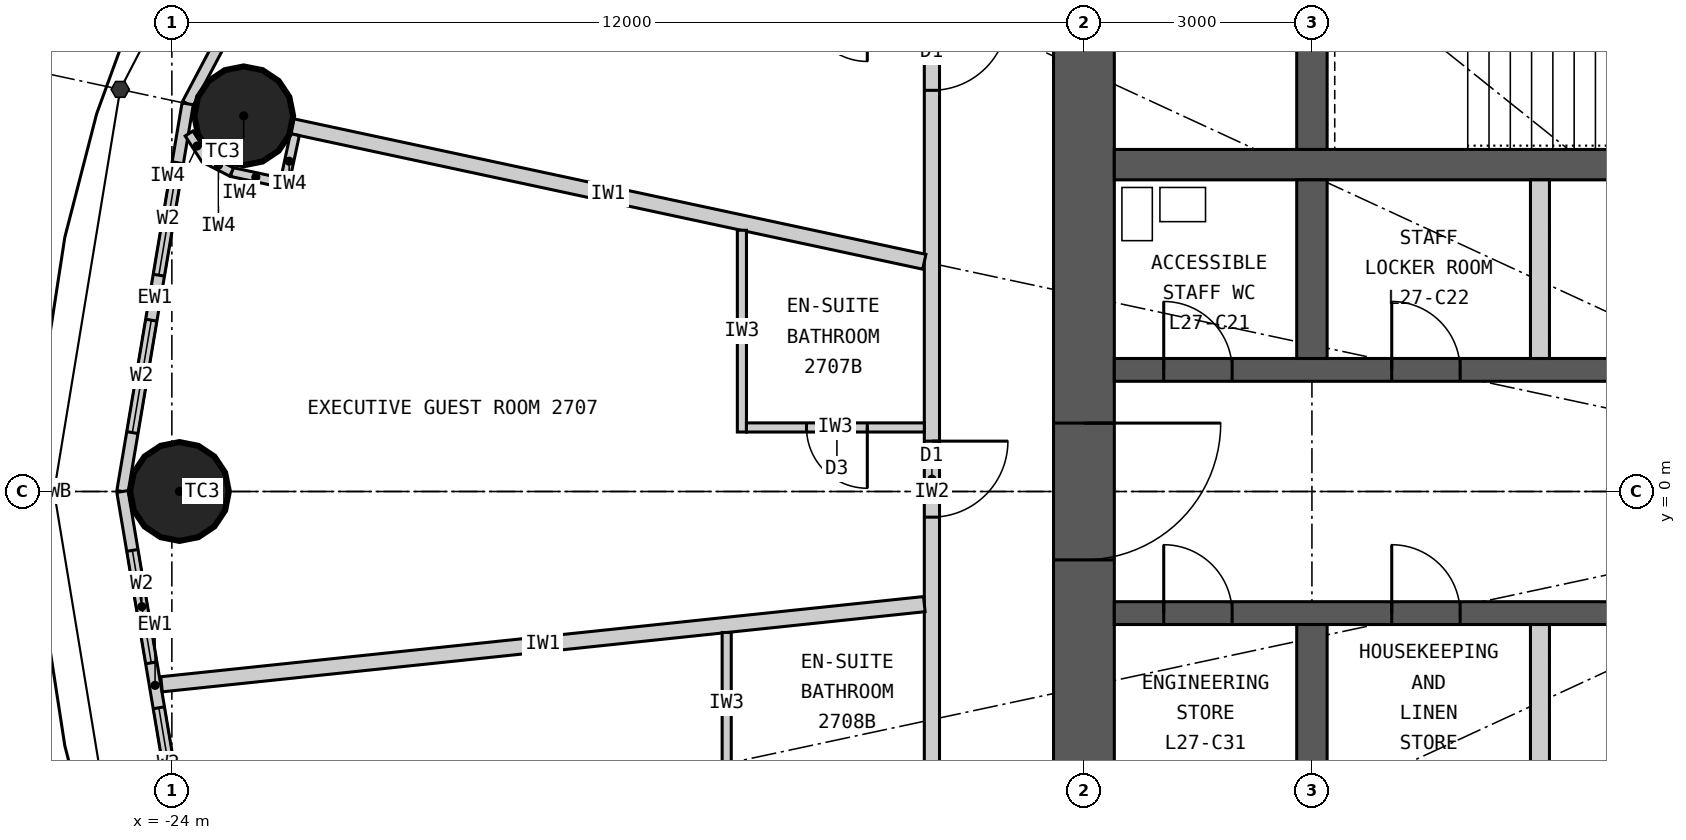
"""IFC4 building model, lengths in metres.
Left out: names, types, materials, properties, quantities, classifications, styles, units other than length and angle.
Written with IfcOpenShell. Run it as: python <this file> out.ifc"""

import sys

from ifc_helpers import new_model, si_unit, direction, frame, frame_2d, origin, origin_2d, place, context, subcontext, project, spatial, rectangle, circle, extrude, element, fill, save


model = new_model("IFC4")
c1 = context("Model", 3, precision=1e-05, world=origin(), true_north=direction((0.0, 1.0)))
c2 = subcontext(c1, "Body", "Model", "MODEL_VIEW")
j1 = project(units=[si_unit("LENGTHUNIT", "METRE"), si_unit("PLANEANGLEUNIT", "RADIAN")], contexts=[c1])
p1 = place(None, origin())
s1 = spatial("IfcSite", under=j1, at=p1, CompositionType="ELEMENT")
p2 = place(p1, origin())
s2 = spatial("IfcBuilding", under=s1, at=p2, CompositionType="ELEMENT")
p3 = place(p2, frame((0.0, 0.0, 108.9)))
s3 = spatial("IfcBuildingStorey", under=s2, at=p3, CompositionType="ELEMENT", Elevation=108.9)
for number, where, z_axis, x_axis in (
    (1, (-23.055, 4.942, 0.0), (0.0, 0.0, 1.0), (1.0, 0.0, 0.0)),
    (2, (-23.9, 0.0, 0.0), (0.0, 0.0, 1.0), (1.0, 0.0, 0.0)),
):
    element("IfcColumn", number, at=place(p3, frame(where, z_axis=z_axis, x_axis=x_axis)), inside=s3, PredefinedType="COLUMN", context=c2, shape_type="SweptSolid", body=[
        extrude(circle(Radius=0.65, at=origin_2d()), origin(), (0.0, 0.0, 1.0), 3.3),
    ])
p4 = place(p3, frame((-12.0, 7.6, 0.0), z_axis=(0.0, 0.0, 1.0), x_axis=(0.0, -1.0, 0.0)))
e3 = element("IfcWall", 3, at=p4, inside=s3, PredefinedType="SHEAR", context=c2, shape_type="SweptSolid", body=[
    extrude(rectangle(XDim=15.2, YDim=0.8, at=frame_2d((7.6, 0.0))), origin(), (0.0, 0.0, 1.0), 3.3),
])
p5 = place(p4, frame((6.7, 0.0, 0.0)))
e4 = element("IfcOpeningElement", 4, at=p5, cuts=e3, PredefinedType="OPENING", context=c2, shape_type="SweptSolid", body=[
    extrude(rectangle(XDim=1.8, YDim=2.2, at=frame_2d((0.9, 1.1))), frame((0.0, 0.41, 0.0), z_axis=(0.0, -1.0, 0.0), x_axis=(1.0, 0.0, 0.0)), (0.0, 0.0, 1.0), 0.82),
])
p6 = place(p3, frame((-11.6, 4.3, 0.0), z_axis=(0.0, 0.0, 1.0), x_axis=(1.0, 0.0, 0.0)))
e5 = element("IfcWall", 5, at=p6, inside=s3, PredefinedType="SHEAR", context=c2, shape_type="SweptSolid", body=[
    extrude(rectangle(XDim=23.2, YDim=0.4, at=frame_2d((11.6, 0.0))), origin(), (0.0, 0.0, 1.0), 3.3),
])
p7 = place(p3, frame((-11.6, 1.6, 0.0), z_axis=(0.0, 0.0, 1.0), x_axis=(1.0, 0.0, 0.0)))
e6 = element("IfcWall", 6, at=p7, inside=s3, PredefinedType="SHEAR", context=c2, shape_type="SweptSolid", body=[
    extrude(rectangle(XDim=23.2, YDim=0.3, at=frame_2d((11.6, 0.0))), origin(), (0.0, 0.0, 1.0), 3.3),
])
p8 = place(p7, frame((6.55, 0.0, 0.0)))
e7 = element("IfcOpeningElement", 7, at=p8, cuts=e6, PredefinedType="OPENING", context=c2, shape_type="SweptSolid", body=[
    extrude(rectangle(XDim=1.1, YDim=2.2, at=frame_2d((0.55, 1.1))), frame((0.0, 0.16, 0.0), z_axis=(0.0, -1.0, 0.0), x_axis=(1.0, 0.0, 0.0)), (0.0, 0.0, 1.0), 0.32),
])
p9 = place(p7, frame((0.65, 0.0, 0.0)))
e8 = element("IfcOpeningElement", 8, at=p9, cuts=e6, PredefinedType="OPENING", context=c2, shape_type="SweptSolid", body=[
    extrude(rectangle(XDim=0.9, YDim=2.2, at=frame_2d((0.45, 1.1))), frame((0.0, 0.16, 0.0), z_axis=(0.0, -1.0, 0.0), x_axis=(1.0, 0.0, 0.0)), (0.0, 0.0, 1.0), 0.32),
])
p10 = place(p7, frame((3.65, 0.0, 0.0)))
e9 = element("IfcOpeningElement", 9, at=p10, cuts=e6, PredefinedType="OPENING", context=c2, shape_type="SweptSolid", body=[
    extrude(rectangle(XDim=0.9, YDim=2.2, at=frame_2d((0.45, 1.1))), frame((0.0, 0.16, 0.0), z_axis=(0.0, -1.0, 0.0), x_axis=(1.0, 0.0, 0.0)), (0.0, 0.0, 1.0), 0.32),
])
p11 = place(p7, frame((21.65, 0.0, 0.0)))
e10 = element("IfcOpeningElement", 10, at=p11, cuts=e6, PredefinedType="OPENING", context=c2, shape_type="SweptSolid", body=[
    extrude(rectangle(XDim=0.9, YDim=2.2, at=frame_2d((0.45, 1.1))), frame((0.0, 0.16, 0.0), z_axis=(0.0, -1.0, 0.0), x_axis=(1.0, 0.0, 0.0)), (0.0, 0.0, 1.0), 0.32),
])
p12 = place(p3, frame((-11.6, -1.6, 0.0), z_axis=(0.0, 0.0, 1.0), x_axis=(1.0, 0.0, 0.0)))
e11 = element("IfcWall", 11, at=p12, inside=s3, PredefinedType="SHEAR", context=c2, shape_type="SweptSolid", body=[
    extrude(rectangle(XDim=23.2, YDim=0.3, at=frame_2d((11.6, 0.0))), origin(), (0.0, 0.0, 1.0), 3.3),
])
p13 = place(p12, frame((6.55, 0.0, 0.0)))
e12 = element("IfcOpeningElement", 12, at=p13, cuts=e11, PredefinedType="OPENING", context=c2, shape_type="SweptSolid", body=[
    extrude(rectangle(XDim=1.1, YDim=2.2, at=frame_2d((0.55, 1.1))), frame((0.0, 0.16, 0.0), z_axis=(0.0, -1.0, 0.0), x_axis=(1.0, 0.0, 0.0)), (0.0, 0.0, 1.0), 0.32),
])
p14 = place(p12, frame((15.3, 0.0, 0.0)))
e13 = element("IfcOpeningElement", 13, at=p14, cuts=e11, PredefinedType="OPENING", context=c2, shape_type="SweptSolid", body=[
    extrude(rectangle(XDim=1.6, YDim=2.4, at=frame_2d((0.8, 1.2))), frame((0.0, 0.16, 0.0), z_axis=(0.0, -1.0, 0.0), x_axis=(1.0, 0.0, 0.0)), (0.0, 0.0, 1.0), 0.32),
])
p15 = place(p12, frame((0.65, 0.0, 0.0)))
e14 = element("IfcOpeningElement", 14, at=p15, cuts=e11, PredefinedType="OPENING", context=c2, shape_type="SweptSolid", body=[
    extrude(rectangle(XDim=0.9, YDim=2.2, at=frame_2d((0.45, 1.1))), frame((0.0, 0.16, 0.0), z_axis=(0.0, -1.0, 0.0), x_axis=(1.0, 0.0, 0.0)), (0.0, 0.0, 1.0), 0.32),
])
p16 = place(p12, frame((3.65, 0.0, 0.0)))
e15 = element("IfcOpeningElement", 15, at=p16, cuts=e11, PredefinedType="OPENING", context=c2, shape_type="SweptSolid", body=[
    extrude(rectangle(XDim=0.9, YDim=2.2, at=frame_2d((0.45, 1.1))), frame((0.0, 0.16, 0.0), z_axis=(0.0, -1.0, 0.0), x_axis=(1.0, 0.0, 0.0)), (0.0, 0.0, 1.0), 0.32),
])
p17 = place(p12, frame((21.65, 0.0, 0.0)))
e16 = element("IfcOpeningElement", 16, at=p17, cuts=e11, PredefinedType="OPENING", context=c2, shape_type="SweptSolid", body=[
    extrude(rectangle(XDim=0.9, YDim=2.2, at=frame_2d((0.45, 1.1))), frame((0.0, 0.16, 0.0), z_axis=(0.0, -1.0, 0.0), x_axis=(1.0, 0.0, 0.0)), (0.0, 0.0, 1.0), 0.32),
])
p18 = place(p3, frame((-9.0, 4.5, 0.0), z_axis=(0.0, 0.0, 1.0), x_axis=(0.0, 1.0, 0.0)))
e17 = element("IfcWall", 17, at=p18, inside=s3, PredefinedType="SHEAR", context=c2, shape_type="SweptSolid", body=[
    extrude(rectangle(XDim=3.1, YDim=0.4, at=frame_2d((1.55, 0.0))), origin(), (0.0, 0.0, 1.0), 3.3),
])
for number, where, z_axis, x_axis in (
    (18, (-9.0, 1.75, 0.0), (0.0, 0.0, 1.0), (0.0, 1.0, 0.0)),
    (19, (-9.0, -4.1, 0.0), (0.0, 0.0, 1.0), (0.0, 1.0, 0.0)),
):
    element("IfcWall", number, at=place(p3, frame(where, z_axis=z_axis, x_axis=x_axis)), inside=s3, PredefinedType="SHEAR", context=c2, shape_type="SweptSolid", body=[
        extrude(rectangle(XDim=2.35, YDim=0.4, at=frame_2d((1.175, 0.0))), origin(), (0.0, 0.0, 1.0), 3.3),
    ])
for number, where, z_axis, x_axis in (
    (20, (-6.0, 1.75, 0.0), (0.0, 0.0, 1.0), (0.0, 1.0, 0.0)),
    (21, (-6.0, -4.1, 0.0), (0.0, 0.0, 1.0), (0.0, 1.0, 0.0)),
):
    element("IfcWall", number, at=place(p3, frame(where, z_axis=z_axis, x_axis=x_axis)), inside=s3, PredefinedType="PARTITIONING", context=c2, shape_type="SweptSolid", body=[
        extrude(rectangle(XDim=2.35, YDim=0.25, at=frame_2d((1.175, 0.0))), origin(), (0.0, 0.0, 1.0), 3.3),
    ])
p19 = place(p3, frame((-21.287, 9.832, 0.0), z_axis=(0.0, 0.0, 1.0), x_axis=(-0.467814388454, -0.883826735257, 0.0)))
e22 = element("IfcWall", 22, at=p19, inside=s3, PredefinedType="ELEMENTEDWALL", context=c2, shape_type="SweptSolid", body=[
    extrude(rectangle(XDim=5.354, YDim=0.15, at=frame_2d((2.677, 0.0))), origin(), (0.0, 0.0, 1.0), 3.12),
])
p20 = place(p19, frame((0.877, 0.0, 0.9)))
e23 = element("IfcOpeningElement", 23, at=p20, cuts=e22, PredefinedType="OPENING", context=c2, shape_type="SweptSolid", body=[
    extrude(rectangle(XDim=1.5, YDim=1.9, at=frame_2d((0.75, 0.95))), frame((0.0, 0.085, 0.0), z_axis=(0.0, -1.0, 0.0), x_axis=(1.0, 0.0, 0.0)), (0.0, 0.0, 1.0), 0.17),
])
p21 = place(p19, frame((2.977, 0.0, 0.9)))
e24 = element("IfcOpeningElement", 24, at=p21, cuts=e22, PredefinedType="OPENING", context=c2, shape_type="SweptSolid", body=[
    extrude(rectangle(XDim=1.5, YDim=1.9, at=frame_2d((0.75, 0.95))), frame((0.0, 0.085, 0.0), z_axis=(0.0, -1.0, 0.0), x_axis=(1.0, 0.0, 0.0)), (0.0, 0.0, 1.0), 0.17),
])
p22 = place(p3, frame((-23.792, 5.1, 0.0), z_axis=(0.0, 0.0, 1.0), x_axis=(-0.165883894218, -0.986145290329, 0.0)))
e25 = element("IfcWall", 25, at=p22, inside=s3, PredefinedType="ELEMENTEDWALL", context=c2, shape_type="SweptSolid", body=[
    extrude(rectangle(XDim=5.172, YDim=0.15, at=frame_2d((2.586, 0.0))), origin(), (0.0, 0.0, 1.0), 3.12),
])
p23 = place(p22, frame((0.786, 0.0, 0.9)))
e26 = element("IfcOpeningElement", 26, at=p23, cuts=e25, PredefinedType="OPENING", context=c2, shape_type="SweptSolid", body=[
    extrude(rectangle(XDim=1.5, YDim=1.9, at=frame_2d((0.75, 0.95))), frame((0.0, 0.085, 0.0), z_axis=(0.0, -1.0, 0.0), x_axis=(1.0, 0.0, 0.0)), (0.0, 0.0, 1.0), 0.17),
])
p24 = place(p22, frame((2.886, 0.0, 0.9)))
e27 = element("IfcOpeningElement", 27, at=p24, cuts=e25, PredefinedType="OPENING", context=c2, shape_type="SweptSolid", body=[
    extrude(rectangle(XDim=1.5, YDim=1.9, at=frame_2d((0.75, 0.95))), frame((0.0, 0.085, 0.0), z_axis=(0.0, -1.0, 0.0), x_axis=(1.0, 0.0, 0.0)), (0.0, 0.0, 1.0), 0.17),
])
p25 = place(p3, frame((-24.65, 0.0, 0.0), z_axis=(0.0, 0.0, 1.0), x_axis=(0.165883894218, -0.986145290329, 0.0)))
e28 = element("IfcWall", 28, at=p25, inside=s3, PredefinedType="ELEMENTEDWALL", context=c2, shape_type="SweptSolid", body=[
    extrude(rectangle(XDim=5.172, YDim=0.15, at=frame_2d((2.586, 0.0))), origin(), (0.0, 0.0, 1.0), 3.12),
])
p26 = place(p25, frame((0.786, 0.0, 0.9)))
e29 = element("IfcOpeningElement", 29, at=p26, cuts=e28, PredefinedType="OPENING", context=c2, shape_type="SweptSolid", body=[
    extrude(rectangle(XDim=1.5, YDim=1.9, at=frame_2d((0.75, 0.95))), frame((0.0, 0.085, 0.0), z_axis=(0.0, -1.0, 0.0), x_axis=(1.0, 0.0, 0.0)), (0.0, 0.0, 1.0), 0.17),
])
p27 = place(p25, frame((2.886, 0.0, 0.9)))
e30 = element("IfcOpeningElement", 30, at=p27, cuts=e28, PredefinedType="OPENING", context=c2, shape_type="SweptSolid", body=[
    extrude(rectangle(XDim=1.5, YDim=1.9, at=frame_2d((0.75, 0.95))), frame((0.0, 0.085, 0.0), z_axis=(0.0, -1.0, 0.0), x_axis=(1.0, 0.0, 0.0)), (0.0, 0.0, 1.0), 0.17),
])
p28 = place(p3, frame((-14.0, 9.9, 0.0), z_axis=(0.0, 0.0, 1.0), x_axis=(0.0, -1.0, 0.0)))
e31 = element("IfcWall", 31, at=p28, inside=s3, PredefinedType="PARTITIONING", context=c2, shape_type="SweptSolid", body=[
    extrude(rectangle(XDim=19.8, YDim=0.2, at=frame_2d((9.9, 0.0))), origin(), (0.0, 0.0, 1.0), 3.12),
])
p29 = place(p28, frame((3.622, 0.0, 0.0)))
e32 = element("IfcOpeningElement", 32, at=p29, cuts=e31, PredefinedType="OPENING", context=c2, shape_type="SweptSolid", body=[
    extrude(rectangle(XDim=1.0, YDim=2.2, at=frame_2d((0.5, 1.1))), frame((0.0, 0.11, 0.0), z_axis=(0.0, -1.0, 0.0), x_axis=(1.0, 0.0, 0.0)), (0.0, 0.0, 1.0), 0.22),
])
p30 = place(p28, frame((9.238, 0.0, 0.0)))
e33 = element("IfcOpeningElement", 33, at=p30, cuts=e31, PredefinedType="OPENING", context=c2, shape_type="SweptSolid", body=[
    extrude(rectangle(XDim=1.0, YDim=2.2, at=frame_2d((0.5, 1.1))), frame((0.0, 0.11, 0.0), z_axis=(0.0, -1.0, 0.0), x_axis=(1.0, 0.0, 0.0)), (0.0, 0.0, 1.0), 0.22),
])
p31 = place(p28, frame((13.742, 0.0, 0.0)))
e34 = element("IfcOpeningElement", 34, at=p31, cuts=e31, PredefinedType="OPENING", context=c2, shape_type="SweptSolid", body=[
    extrude(rectangle(XDim=1.0, YDim=2.2, at=frame_2d((0.5, 1.1))), frame((0.0, 0.11, 0.0), z_axis=(0.0, -1.0, 0.0), x_axis=(1.0, 0.0, 0.0)), (0.0, 0.0, 1.0), 0.22),
])
p32 = place(p28, frame((18.698, 0.0, 0.0)))
e35 = element("IfcOpeningElement", 35, at=p32, cuts=e31, PredefinedType="OPENING", context=c2, shape_type="SweptSolid", body=[
    extrude(rectangle(XDim=1.0, YDim=2.2, at=frame_2d((0.5, 1.1))), frame((0.0, 0.11, 0.0), z_axis=(0.0, -1.0, 0.0), x_axis=(1.0, 0.0, 0.0)), (0.0, 0.0, 1.0), 0.22),
])
p33 = place(p3, frame((-14.1, 3.022, 0.0), z_axis=(0.0, 0.0, 1.0), x_axis=(-0.977783513367, 0.209617272638, 0.0)))
e36 = element("IfcWall", 36, at=p33, inside=s3, PredefinedType="PARTITIONING", context=c2, shape_type="SweptSolid", body=[
    extrude(rectangle(XDim=8.508, YDim=0.2, at=frame_2d((4.254, 0.0))), origin(), (0.0, 0.0, 1.0), 2.37),
])
p34 = place(p3, frame((-14.1, -1.482, 0.0), z_axis=(0.0, 0.0, 1.0), x_axis=(-0.994523202615, -0.104516024894, 0.0)))
e37 = element("IfcWall", 37, at=p34, inside=s3, PredefinedType="PARTITIONING", context=c2, shape_type="SweptSolid", body=[
    extrude(rectangle(XDim=10.091, YDim=0.2, at=frame_2d((5.045, 0.0))), origin(), (0.0, 0.0, 1.0), 2.47),
])
p35 = place(p3, frame((-16.5, 3.437, 0.0), z_axis=(0.0, 0.0, 1.0), x_axis=(0.0, -1.0, 0.0)))
e38 = element("IfcWall", 38, at=p35, inside=s3, PredefinedType="PARTITIONING", context=c2, shape_type="SweptSolid", body=[
    extrude(rectangle(XDim=2.655, YDim=0.12, at=frame_2d((1.327, 0.0))), origin(), (0.0, 0.0, 1.0), 3.12),
])
p36 = place(p3, frame((-14.1, 0.843, 0.0), z_axis=(0.0, 0.0, 1.0), x_axis=(-1.0, 0.0, 0.0)))
e39 = element("IfcWall", 39, at=p36, inside=s3, PredefinedType="PARTITIONING", context=c2, shape_type="SweptSolid", body=[
    extrude(rectangle(XDim=2.34, YDim=0.12, at=frame_2d((1.17, 0.0))), origin(), (0.0, 0.0, 1.0), 3.12),
])
p37 = place(p36, frame((0.75, 0.0, 0.0)))
e40 = element("IfcOpeningElement", 40, at=p37, cuts=e39, PredefinedType="OPENING", context=c2, shape_type="SweptSolid", body=[
    extrude(rectangle(XDim=0.8, YDim=2.1, at=frame_2d((0.4, 1.05))), frame((0.0, 0.07, 0.0), z_axis=(0.0, -1.0, 0.0), x_axis=(1.0, 0.0, 0.0)), (0.0, 0.0, 1.0), 0.14),
])
p38 = place(p3, frame((-16.7, -1.855, 0.0), z_axis=(0.0, 0.0, 1.0), x_axis=(0.0, -1.0, 0.0)))
e41 = element("IfcWall", 41, at=p38, inside=s3, PredefinedType="PARTITIONING", context=c2, shape_type="SweptSolid", body=[
    extrude(rectangle(XDim=1.867, YDim=0.12, at=frame_2d((0.933, 0.0))), origin(), (0.0, 0.0, 1.0), 3.12),
])
p39 = place(p3, frame((-22.382, 4.695, 0.0), z_axis=(0.0, 0.0, 1.0), x_axis=(-0.209808658628, -0.977742464438, 0.0)))
e42 = element("IfcWall", 42, at=p39, inside=s3, PredefinedType="PARTITIONING", context=c2, shape_type="SweptSolid", body=[
    extrude(rectangle(XDim=0.716, YDim=0.12, at=frame_2d((0.358, 0.0))), origin(), (0.0, 0.0, 1.0), 3.12),
])
p40 = place(p3, frame((-22.578, 4.067, 0.0), z_axis=(0.0, 0.0, 1.0), x_axis=(-0.977802414077, 0.209529088731, 0.0)))
e43 = element("IfcWall", 43, at=p40, inside=s3, PredefinedType="PARTITIONING", context=c2, shape_type="SweptSolid", body=[
    extrude(rectangle(XDim=0.65, YDim=0.12, at=frame_2d((0.325, 0.0))), origin(), (0.0, 0.0, 1.0), 3.12),
])
for number, where, z_axis, x_axis in (
    (44, (-23.213, 4.203, 0.0), (0.0, 0.0, 1.0), (-0.89, 0.456, 0.0)),
    (45, (-23.562, 4.381, 0.0), (0.0, 0.0, 1.0), (-0.543, 0.84, 0.0)),
):
    element("IfcWall", number, at=place(p3, frame(where, z_axis=z_axis, x_axis=x_axis)), inside=s3, PredefinedType="PARTITIONING", context=c2, shape_type="SweptSolid", body=[
        extrude(rectangle(XDim=0.391, YDim=0.12, at=frame_2d((0.196, 0.0))), origin(), (0.0, 0.0, 1.0), 3.12),
    ])
p41 = place(p23, origin())
e46 = element("IfcWindow", 46, at=p41, inside=s3, PartitioningType="SINGLE_PANEL", PredefinedType="WINDOW", context=c2, shape_type="SweptSolid", body=[
    extrude(rectangle(XDim=1.5, YDim=1.9, at=frame_2d((0.75, 0.95))), frame((0.0, 0.03, 0.0), z_axis=(0.0, -1.0, 0.0), x_axis=(1.0, 0.0, 0.0)), (0.0, 0.0, 1.0), 0.06),
])
fill(e26, e46)
p42 = place(p24, origin())
e47 = element("IfcWindow", 47, at=p42, inside=s3, PartitioningType="SINGLE_PANEL", PredefinedType="WINDOW", context=c2, shape_type="SweptSolid", body=[
    extrude(rectangle(XDim=1.5, YDim=1.9, at=frame_2d((0.75, 0.95))), frame((0.0, 0.03, 0.0), z_axis=(0.0, -1.0, 0.0), x_axis=(1.0, 0.0, 0.0)), (0.0, 0.0, 1.0), 0.06),
])
fill(e27, e47)
p43 = place(p26, origin())
e48 = element("IfcWindow", 48, at=p43, inside=s3, PartitioningType="SINGLE_PANEL", PredefinedType="WINDOW", context=c2, shape_type="SweptSolid", body=[
    extrude(rectangle(XDim=1.5, YDim=1.9, at=frame_2d((0.75, 0.95))), frame((0.0, 0.03, 0.0), z_axis=(0.0, -1.0, 0.0), x_axis=(1.0, 0.0, 0.0)), (0.0, 0.0, 1.0), 0.06),
])
fill(e29, e48)
p44 = place(p27, origin())
e49 = element("IfcWindow", 49, at=p44, inside=s3, PartitioningType="SINGLE_PANEL", PredefinedType="WINDOW", context=c2, shape_type="SweptSolid", body=[
    extrude(rectangle(XDim=1.5, YDim=1.9, at=frame_2d((0.75, 0.95))), frame((0.0, 0.03, 0.0), z_axis=(0.0, -1.0, 0.0), x_axis=(1.0, 0.0, 0.0)), (0.0, 0.0, 1.0), 0.06),
])
fill(e30, e49)
p45 = place(p29, origin())
e50 = element("IfcDoor", 50, at=p45, inside=s3, OperationType="SINGLE_SWING_LEFT", PredefinedType="DOOR", context=c2, shape_type="SweptSolid", body=[
    extrude(rectangle(XDim=1.0, YDim=2.2, at=frame_2d((0.5, 1.1))), frame((0.0, 0.025, 0.0), z_axis=(0.0, -1.0, 0.0), x_axis=(1.0, 0.0, 0.0)), (0.0, 0.0, 1.0), 0.05),
])
fill(e32, e50)
p46 = place(p37, origin())
e51 = element("IfcDoor", 51, at=p46, inside=s3, OperationType="SINGLE_SWING_LEFT", PredefinedType="DOOR", context=c2, shape_type="SweptSolid", body=[
    extrude(rectangle(XDim=0.8, YDim=2.1, at=frame_2d((0.4, 1.05))), frame((0.0, 0.025, 0.0), z_axis=(0.0, -1.0, 0.0), x_axis=(1.0, 0.0, 0.0)), (0.0, 0.0, 1.0), 0.05),
])
fill(e40, e51)
p47 = place(p30, origin())
e52 = element("IfcDoor", 52, at=p47, inside=s3, OperationType="SINGLE_SWING_LEFT", PredefinedType="DOOR", context=c2, shape_type="SweptSolid", body=[
    extrude(rectangle(XDim=1.0, YDim=2.2, at=frame_2d((0.5, 1.1))), frame((0.0, 0.025, 0.0), z_axis=(0.0, -1.0, 0.0), x_axis=(1.0, 0.0, 0.0)), (0.0, 0.0, 1.0), 0.05),
])
fill(e33, e52)
p48 = place(p9, origin())
e53 = element("IfcDoor", 53, at=p48, inside=s3, OperationType="SINGLE_SWING_LEFT", PredefinedType="DOOR", context=c2, shape_type="SweptSolid", body=[
    extrude(rectangle(XDim=0.9, YDim=2.2, at=frame_2d((0.45, 1.1))), frame((0.0, 0.025, 0.0), z_axis=(0.0, -1.0, 0.0), x_axis=(1.0, 0.0, 0.0)), (0.0, 0.0, 1.0), 0.05),
])
fill(e8, e53)
p49 = place(p10, origin())
e54 = element("IfcDoor", 54, at=p49, inside=s3, OperationType="SINGLE_SWING_LEFT", PredefinedType="DOOR", context=c2, shape_type="SweptSolid", body=[
    extrude(rectangle(XDim=0.9, YDim=2.2, at=frame_2d((0.45, 1.1))), frame((0.0, 0.025, 0.0), z_axis=(0.0, -1.0, 0.0), x_axis=(1.0, 0.0, 0.0)), (0.0, 0.0, 1.0), 0.05),
])
fill(e9, e54)
p50 = place(p15, origin())
e55 = element("IfcDoor", 55, at=p50, inside=s3, OperationType="SINGLE_SWING_LEFT", PredefinedType="DOOR", context=c2, shape_type="SweptSolid", body=[
    extrude(rectangle(XDim=0.9, YDim=2.2, at=frame_2d((0.45, 1.1))), frame((0.0, 0.025, 0.0), z_axis=(0.0, -1.0, 0.0), x_axis=(1.0, 0.0, 0.0)), (0.0, 0.0, 1.0), 0.05),
])
fill(e14, e55)
p51 = place(p16, origin())
e56 = element("IfcDoor", 56, at=p51, inside=s3, OperationType="SINGLE_SWING_LEFT", PredefinedType="DOOR", context=c2, shape_type="SweptSolid", body=[
    extrude(rectangle(XDim=0.9, YDim=2.2, at=frame_2d((0.45, 1.1))), frame((0.0, 0.025, 0.0), z_axis=(0.0, -1.0, 0.0), x_axis=(1.0, 0.0, 0.0)), (0.0, 0.0, 1.0), 0.05),
])
fill(e15, e56)
p52 = place(p5, origin())
e57 = element("IfcDoor", 57, at=p52, inside=s3, OperationType="DOUBLE_DOOR_DOUBLE_SWING", PredefinedType="DOOR", context=c2, shape_type="SweptSolid", body=[
    extrude(rectangle(XDim=1.8, YDim=2.2, at=frame_2d((0.9, 1.1))), frame((0.0, 0.025, 0.0), z_axis=(0.0, -1.0, 0.0), x_axis=(1.0, 0.0, 0.0)), (0.0, 0.0, 1.0), 0.05),
])
fill(e4, e57)
save(model, sys.argv[1])
